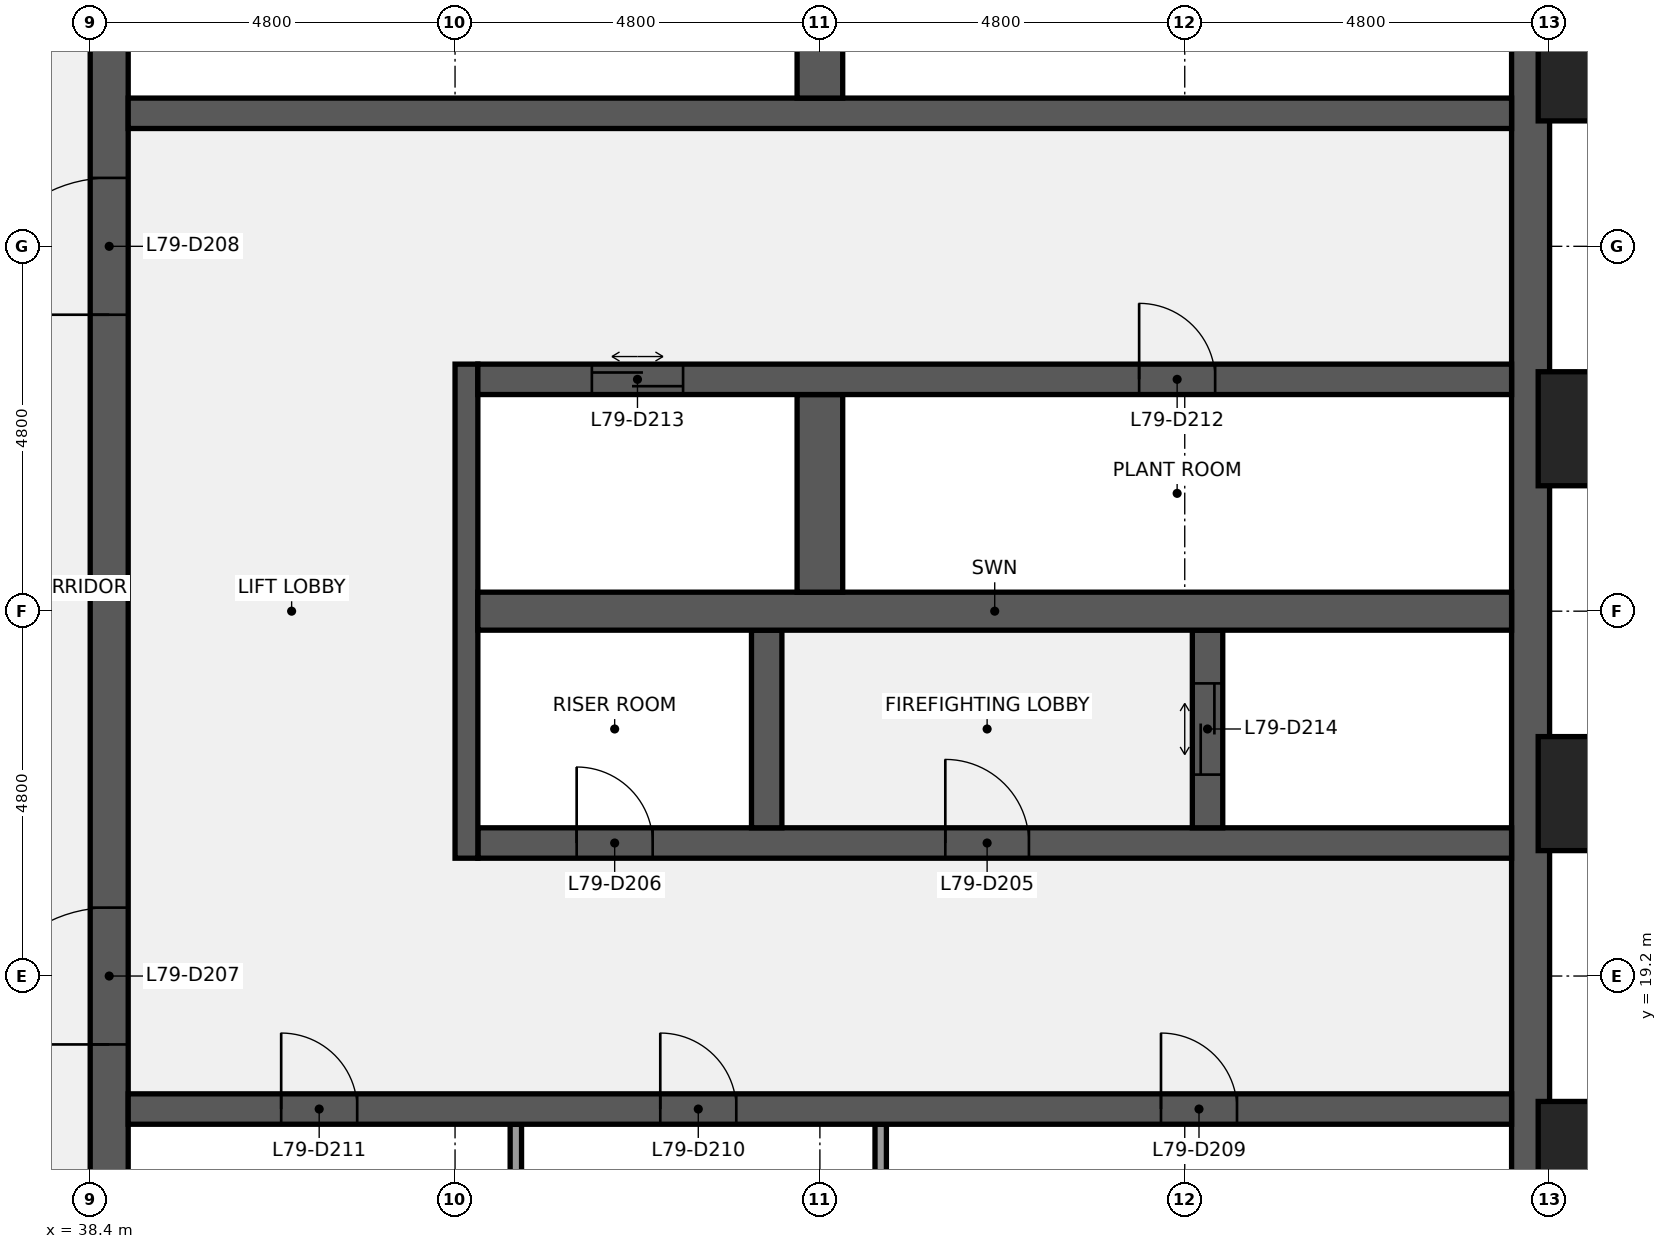
"""IFC4 building model, lengths in metres.
Left out: names, types, materials, properties, quantities, classifications, styles, units other than length and angle.
Written with IfcOpenShell. Run it as: python <this file> out.ifc"""

import sys

from ifc_helpers import new_model, si_unit, direction, frame, frame_2d, origin, origin_2d, place, context, subcontext, project, spatial, rectangle, extrude, element, fill, save


model = new_model("IFC4")
c1 = context("Model", 3, precision=1e-05, world=origin(), true_north=direction((0.0, 1.0)))
c2 = subcontext(c1, "Body", "Model", "MODEL_VIEW")
j1 = project(units=[si_unit("LENGTHUNIT", "METRE"), si_unit("PLANEANGLEUNIT", "RADIAN")], contexts=[c1])
p1 = place(None, origin())
s1 = spatial("IfcSite", under=j1, at=p1, CompositionType="ELEMENT")
p2 = place(p1, origin())
s2 = spatial("IfcBuilding", under=s1, at=p2, CompositionType="ELEMENT")
p3 = place(p2, frame((0.0, 0.0, 354.3)))
s3 = spatial("IfcBuildingStorey", under=s2, at=p3, CompositionType="ELEMENT", Elevation=354.3)
p4 = place(p3, frame((57.35, 38.4, 0.0), z_axis=(0.0, 0.0, 1.0), x_axis=(0.0, -1.0, 0.0)))
e1 = element("IfcWall", 1, at=p4, inside=s3, PredefinedType="SHEAR", context=c2, shape_type="SweptSolid", body=[
    extrude(rectangle(XDim=28.8, YDim=0.5, at=frame_2d((14.4, 0.0))), origin(), (0.0, 0.0, 1.0), 3.75),
])
p5 = place(p3, frame((38.65, 9.6, 0.0), z_axis=(0.0, 0.0, 1.0), x_axis=(0.0, 1.0, 0.0)))
e2 = element("IfcWall", 2, at=p5, inside=s3, PredefinedType="SHEAR", context=c2, shape_type="SweptSolid", body=[
    extrude(rectangle(XDim=28.8, YDim=0.5, at=frame_2d((14.4, 0.0))), origin(), (0.0, 0.0, 1.0), 3.75),
])
p6 = place(p5, frame((8.7, 0.0, 0.0)))
e3 = element("IfcOpeningElement", 3, at=p6, cuts=e2, PredefinedType="OPENING", context=c2, shape_type="SweptSolid", body=[
    extrude(rectangle(XDim=1.8, YDim=2.1, at=frame_2d((0.9, 1.05))), frame((0.0, 0.26, 0.0), z_axis=(0.0, -1.0, 0.0), x_axis=(1.0, 0.0, 0.0)), (0.0, 0.0, 1.0), 0.52),
])
p7 = place(p5, frame((18.3, 0.0, 0.0)))
e4 = element("IfcOpeningElement", 4, at=p7, cuts=e2, PredefinedType="OPENING", context=c2, shape_type="SweptSolid", body=[
    extrude(rectangle(XDim=1.8, YDim=2.1, at=frame_2d((0.9, 1.05))), frame((0.0, 0.26, 0.0), z_axis=(0.0, -1.0, 0.0), x_axis=(1.0, 0.0, 0.0)), (0.0, 0.0, 1.0), 0.52),
])
for number, where, z_axis, x_axis in (
    (5, (48.8, 14.65, 0.0), (0.0, 0.0, 1.0), (0.0, 1.0, 0.0)),
    (6, (44.0, 14.65, 0.0), (0.0, 0.0, 1.0), (0.0, 1.0, 0.0)),
):
    element("IfcWall", number, at=place(p3, frame(where, z_axis=z_axis, x_axis=x_axis)), inside=s3, PredefinedType="PARTITIONING", context=c2, shape_type="SweptSolid", body=[
        extrude(rectangle(XDim=2.6, YDim=0.15, at=frame_2d((1.3, 0.0))), origin(), (0.0, 0.0, 1.0), 3.75),
    ])
p8 = place(p3, frame((38.9, 17.45, 0.0), z_axis=(0.0, 0.0, 1.0), x_axis=(1.0, 0.0, 0.0)))
e7 = element("IfcWall", 7, at=p8, inside=s3, PredefinedType="SHEAR", context=c2, shape_type="SweptSolid", body=[
    extrude(rectangle(XDim=18.2, YDim=0.4, at=frame_2d((9.1, 0.0))), origin(), (0.0, 0.0, 1.0), 3.75),
])
p9 = place(p8, frame((13.587, 0.0, 0.0)))
e8 = element("IfcOpeningElement", 8, at=p9, cuts=e7, PredefinedType="OPENING", context=c2, shape_type="SweptSolid", body=[
    extrude(rectangle(XDim=1.0, YDim=2.1, at=frame_2d((0.5, 1.05))), frame((0.0, 0.21, 0.0), z_axis=(0.0, -1.0, 0.0), x_axis=(1.0, 0.0, 0.0)), (0.0, 0.0, 1.0), 0.42),
])
p10 = place(p8, frame((7.0, 0.0, 0.0)))
e9 = element("IfcOpeningElement", 9, at=p10, cuts=e7, PredefinedType="OPENING", context=c2, shape_type="SweptSolid", body=[
    extrude(rectangle(XDim=1.0, YDim=2.1, at=frame_2d((0.5, 1.05))), frame((0.0, 0.21, 0.0), z_axis=(0.0, -1.0, 0.0), x_axis=(1.0, 0.0, 0.0)), (0.0, 0.0, 1.0), 0.42),
])
p11 = place(p8, frame((2.012, 0.0, 0.0)))
e10 = element("IfcOpeningElement", 10, at=p11, cuts=e7, PredefinedType="OPENING", context=c2, shape_type="SweptSolid", body=[
    extrude(rectangle(XDim=1.0, YDim=2.1, at=frame_2d((0.5, 1.05))), frame((0.0, 0.21, 0.0), z_axis=(0.0, -1.0, 0.0), x_axis=(1.0, 0.0, 0.0)), (0.0, 0.0, 1.0), 0.42),
])
p12 = place(p3, frame((43.5, 20.95, 0.0), z_axis=(0.0, 0.0, 1.0), x_axis=(1.0, 0.0, 0.0)))
e11 = element("IfcWall", 11, at=p12, inside=s3, PredefinedType="SHEAR", context=c2, shape_type="SweptSolid", body=[
    extrude(rectangle(XDim=13.6, YDim=0.4, at=frame_2d((6.8, 0.0))), origin(), (0.0, 0.0, 1.0), 3.75),
])
p13 = place(p12, frame((6.15, 0.0, 0.0)))
e12 = element("IfcOpeningElement", 12, at=p13, cuts=e11, PredefinedType="OPENING", context=c2, shape_type="SweptSolid", body=[
    extrude(rectangle(XDim=1.1, YDim=2.1, at=frame_2d((0.55, 1.05))), frame((0.0, 0.21, 0.0), z_axis=(0.0, -1.0, 0.0), x_axis=(1.0, 0.0, 0.0)), (0.0, 0.0, 1.0), 0.42),
])
p14 = place(p12, frame((1.3, 0.0, 0.0)))
e13 = element("IfcOpeningElement", 13, at=p14, cuts=e11, PredefinedType="OPENING", context=c2, shape_type="SweptSolid", body=[
    extrude(rectangle(XDim=1.0, YDim=2.1, at=frame_2d((0.5, 1.05))), frame((0.0, 0.21, 0.0), z_axis=(0.0, -1.0, 0.0), x_axis=(1.0, 0.0, 0.0)), (0.0, 0.0, 1.0), 0.42),
])
p15 = place(p3, frame((43.35, 20.75, 0.0), z_axis=(0.0, 0.0, 1.0), x_axis=(0.0, 1.0, 0.0)))
e14 = element("IfcWall", 14, at=p15, inside=s3, PredefinedType="SHEAR", context=c2, shape_type="SweptSolid", body=[
    extrude(rectangle(XDim=6.5, YDim=0.3, at=frame_2d((3.25, 0.0))), origin(), (0.0, 0.0, 1.0), 3.75),
])
p16 = place(p3, frame((53.1, 21.15, 0.0), z_axis=(0.0, 0.0, 1.0), x_axis=(0.0, 1.0, 0.0)))
e15 = element("IfcWall", 15, at=p16, inside=s3, PredefinedType="SHEAR", context=c2, shape_type="SweptSolid", body=[
    extrude(rectangle(XDim=2.6, YDim=0.4, at=frame_2d((1.3, 0.0))), origin(), (0.0, 0.0, 1.0), 3.75),
])
p17 = place(p16, frame((0.7, 0.0, 0.0)))
e16 = element("IfcOpeningElement", 16, at=p17, cuts=e15, PredefinedType="OPENING", context=c2, shape_type="SweptSolid", body=[
    extrude(rectangle(XDim=1.2, YDim=2.1, at=frame_2d((0.6, 1.05))), frame((0.0, 0.21, 0.0), z_axis=(0.0, -1.0, 0.0), x_axis=(1.0, 0.0, 0.0)), (0.0, 0.0, 1.0), 0.42),
])
p18 = place(p3, frame((47.3, 21.15, 0.0), z_axis=(0.0, 0.0, 1.0), x_axis=(0.0, 1.0, 0.0)))
e17 = element("IfcWall", 17, at=p18, inside=s3, PredefinedType="SHEAR", context=c2, shape_type="SweptSolid", body=[
    extrude(rectangle(XDim=2.6, YDim=0.4, at=frame_2d((1.3, 0.0))), origin(), (0.0, 0.0, 1.0), 3.75),
])
p19 = place(p3, frame((43.5, 24.0, 0.0), z_axis=(0.0, 0.0, 1.0), x_axis=(1.0, 0.0, 0.0)))
e18 = element("IfcWall", 18, at=p19, inside=s3, PredefinedType="SHEAR", context=c2, shape_type="SweptSolid", body=[
    extrude(rectangle(XDim=13.6, YDim=0.5, at=frame_2d((6.8, 0.0))), origin(), (0.0, 0.0, 1.0), 3.75),
])
p20 = place(p3, frame((48.0, 24.25, 0.0), z_axis=(0.0, 0.0, 1.0), x_axis=(0.0, 1.0, 0.0)))
e19 = element("IfcWall", 19, at=p20, inside=s3, PredefinedType="SHEAR", context=c2, shape_type="SweptSolid", body=[
    extrude(rectangle(XDim=2.6, YDim=0.6, at=frame_2d((1.3, 0.0))), origin(), (0.0, 0.0, 1.0), 3.75),
])
p21 = place(p3, frame((43.5, 27.05, 0.0), z_axis=(0.0, 0.0, 1.0), x_axis=(1.0, 0.0, 0.0)))
e20 = element("IfcWall", 20, at=p21, inside=s3, PredefinedType="SHEAR", context=c2, shape_type="SweptSolid", body=[
    extrude(rectangle(XDim=13.6, YDim=0.4, at=frame_2d((6.8, 0.0))), origin(), (0.0, 0.0, 1.0), 3.75),
])
p22 = place(p21, frame((8.7, 0.0, 0.0)))
e21 = element("IfcOpeningElement", 21, at=p22, cuts=e20, PredefinedType="OPENING", context=c2, shape_type="SweptSolid", body=[
    extrude(rectangle(XDim=1.0, YDim=2.1, at=frame_2d((0.5, 1.05))), frame((0.0, 0.21, 0.0), z_axis=(0.0, -1.0, 0.0), x_axis=(1.0, 0.0, 0.0)), (0.0, 0.0, 1.0), 0.42),
])
p23 = place(p21, frame((1.5, 0.0, 0.0)))
e22 = element("IfcOpeningElement", 22, at=p23, cuts=e20, PredefinedType="OPENING", context=c2, shape_type="SweptSolid", body=[
    extrude(rectangle(XDim=1.2, YDim=2.1, at=frame_2d((0.6, 1.05))), frame((0.0, 0.21, 0.0), z_axis=(0.0, -1.0, 0.0), x_axis=(1.0, 0.0, 0.0)), (0.0, 0.0, 1.0), 0.42),
])
p24 = place(p3, frame((38.9, 30.55, 0.0), z_axis=(0.0, 0.0, 1.0), x_axis=(1.0, 0.0, 0.0)))
e23 = element("IfcWall", 23, at=p24, inside=s3, PredefinedType="SHEAR", context=c2, shape_type="SweptSolid", body=[
    extrude(rectangle(XDim=18.2, YDim=0.4, at=frame_2d((9.1, 0.0))), origin(), (0.0, 0.0, 1.0), 3.75),
])
p25 = place(p3, frame((48.0, 30.75, 0.0), z_axis=(0.0, 0.0, 1.0), x_axis=(0.0, 1.0, 0.0)))
e24 = element("IfcWall", 24, at=p25, inside=s3, PredefinedType="SHEAR", context=c2, shape_type="SweptSolid", body=[
    extrude(rectangle(XDim=2.6, YDim=0.6, at=frame_2d((1.3, 0.0))), origin(), (0.0, 0.0, 1.0), 3.75),
])
for number, where, z_axis, x_axis in (
    (25, (58.35, 16.8, 0.0), (0.0, 0.0, 1.0), (0.0, 1.0, 0.0)),
    (26, (58.35, 21.6, 0.0), (0.0, 0.0, 1.0), (0.0, 1.0, 0.0)),
    (27, (58.35, 26.4, 0.0), (0.0, 0.0, 1.0), (0.0, 1.0, 0.0)),
    (28, (58.35, 31.2, 0.0), (0.0, 0.0, 1.0), (0.0, 1.0, 0.0)),
):
    element("IfcColumn", number, at=place(p3, frame(where, z_axis=z_axis, x_axis=x_axis)), inside=s3, PredefinedType="PILASTER", context=c2, shape_type="SweptSolid", body=[
        extrude(rectangle(XDim=1.8, YDim=1.5, at=origin_2d()), origin(), (0.0, 0.0, 1.0), 4.0),
    ])
p26 = place(p13, origin())
e29 = element("IfcDoor", 29, at=p26, inside=s3, OperationType="SINGLE_SWING_LEFT", PredefinedType="DOOR", context=c2, shape_type="SweptSolid", body=[
    extrude(rectangle(XDim=1.1, YDim=2.1, at=frame_2d((0.55, 1.05))), frame((0.0, 0.025, 0.0), z_axis=(0.0, -1.0, 0.0), x_axis=(1.0, 0.0, 0.0)), (0.0, 0.0, 1.0), 0.05),
])
fill(e12, e29)
p27 = place(p14, origin())
e30 = element("IfcDoor", 30, at=p27, inside=s3, OperationType="SINGLE_SWING_LEFT", PredefinedType="DOOR", context=c2, shape_type="SweptSolid", body=[
    extrude(rectangle(XDim=1.0, YDim=2.1, at=frame_2d((0.5, 1.05))), frame((0.0, 0.025, 0.0), z_axis=(0.0, -1.0, 0.0), x_axis=(1.0, 0.0, 0.0)), (0.0, 0.0, 1.0), 0.05),
])
fill(e13, e30)
p28 = place(p6, origin())
e31 = element("IfcDoor", 31, at=p28, inside=s3, OperationType="DOUBLE_DOOR_SINGLE_SWING", PredefinedType="DOOR", context=c2, shape_type="SweptSolid", body=[
    extrude(rectangle(XDim=1.8, YDim=2.1, at=frame_2d((0.9, 1.05))), frame((0.0, 0.025, 0.0), z_axis=(0.0, -1.0, 0.0), x_axis=(1.0, 0.0, 0.0)), (0.0, 0.0, 1.0), 0.05),
])
fill(e3, e31)
p29 = place(p7, origin())
e32 = element("IfcDoor", 32, at=p29, inside=s3, OperationType="DOUBLE_DOOR_SINGLE_SWING", PredefinedType="DOOR", context=c2, shape_type="SweptSolid", body=[
    extrude(rectangle(XDim=1.8, YDim=2.1, at=frame_2d((0.9, 1.05))), frame((0.0, 0.025, 0.0), z_axis=(0.0, -1.0, 0.0), x_axis=(1.0, 0.0, 0.0)), (0.0, 0.0, 1.0), 0.05),
])
fill(e4, e32)
p30 = place(p9, origin())
e33 = element("IfcDoor", 33, at=p30, inside=s3, OperationType="SINGLE_SWING_LEFT", PredefinedType="DOOR", context=c2, shape_type="SweptSolid", body=[
    extrude(rectangle(XDim=1.0, YDim=2.1, at=frame_2d((0.5, 1.05))), frame((0.0, 0.025, 0.0), z_axis=(0.0, -1.0, 0.0), x_axis=(1.0, 0.0, 0.0)), (0.0, 0.0, 1.0), 0.05),
])
fill(e8, e33)
p31 = place(p10, origin())
e34 = element("IfcDoor", 34, at=p31, inside=s3, OperationType="SINGLE_SWING_LEFT", PredefinedType="DOOR", context=c2, shape_type="SweptSolid", body=[
    extrude(rectangle(XDim=1.0, YDim=2.1, at=frame_2d((0.5, 1.05))), frame((0.0, 0.025, 0.0), z_axis=(0.0, -1.0, 0.0), x_axis=(1.0, 0.0, 0.0)), (0.0, 0.0, 1.0), 0.05),
])
fill(e9, e34)
p32 = place(p11, origin())
e35 = element("IfcDoor", 35, at=p32, inside=s3, OperationType="SINGLE_SWING_LEFT", PredefinedType="DOOR", context=c2, shape_type="SweptSolid", body=[
    extrude(rectangle(XDim=1.0, YDim=2.1, at=frame_2d((0.5, 1.05))), frame((0.0, 0.025, 0.0), z_axis=(0.0, -1.0, 0.0), x_axis=(1.0, 0.0, 0.0)), (0.0, 0.0, 1.0), 0.05),
])
fill(e10, e35)
p33 = place(p22, origin())
e36 = element("IfcDoor", 36, at=p33, inside=s3, OperationType="SINGLE_SWING_LEFT", PredefinedType="DOOR", context=c2, shape_type="SweptSolid", body=[
    extrude(rectangle(XDim=1.0, YDim=2.1, at=frame_2d((0.5, 1.05))), frame((0.0, 0.025, 0.0), z_axis=(0.0, -1.0, 0.0), x_axis=(1.0, 0.0, 0.0)), (0.0, 0.0, 1.0), 0.05),
])
fill(e21, e36)
p34 = place(p23, origin())
e37 = element("IfcDoor", 37, at=p34, inside=s3, OperationType="DOUBLE_DOOR_SLIDING", PredefinedType="DOOR", context=c2, shape_type="SweptSolid", body=[
    extrude(rectangle(XDim=1.2, YDim=2.1, at=frame_2d((0.6, 1.05))), frame((0.0, 0.025, 0.0), z_axis=(0.0, -1.0, 0.0), x_axis=(1.0, 0.0, 0.0)), (0.0, 0.0, 1.0), 0.05),
])
fill(e22, e37)
p35 = place(p17, origin())
e38 = element("IfcDoor", 38, at=p35, inside=s3, OperationType="DOUBLE_DOOR_SLIDING", PredefinedType="DOOR", context=c2, shape_type="SweptSolid", body=[
    extrude(rectangle(XDim=1.2, YDim=2.1, at=frame_2d((0.6, 1.05))), frame((0.0, 0.025, 0.0), z_axis=(0.0, -1.0, 0.0), x_axis=(1.0, 0.0, 0.0)), (0.0, 0.0, 1.0), 0.05),
])
fill(e16, e38)
save(model, sys.argv[1])
